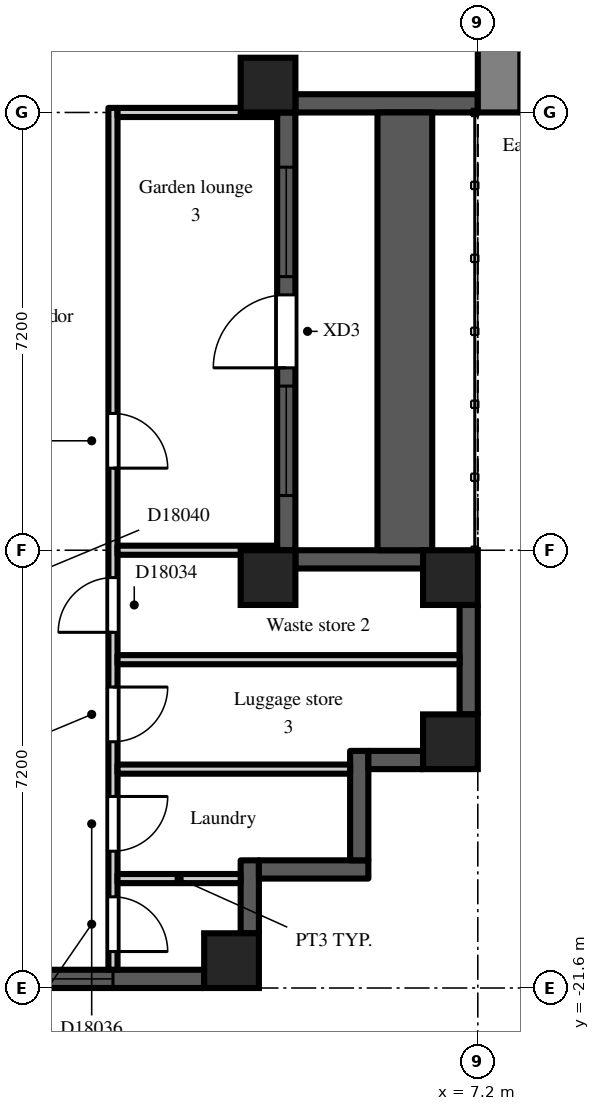
"""IFC4 building model, lengths in metres.
Left out: names, types, materials, properties, quantities, classifications, styles, units other than length and angle.
Written with IfcOpenShell. Run it as: python <this file> out.ifc"""

import sys

from ifc_helpers import new_model, si_unit, direction, frame, frame_2d, origin, origin_2d, place, context, subcontext, project, spatial, rectangle, extrude, element, fill, save


model = new_model("IFC4")
c1 = context("Model", 3, precision=1e-05, world=origin(), true_north=direction((0.0, 1.0)))
c2 = subcontext(c1, "Body", "Model", "MODEL_VIEW")
j1 = project(units=[si_unit("LENGTHUNIT", "METRE"), si_unit("PLANEANGLEUNIT", "RADIAN")], contexts=[c1])
p1 = place(None, origin())
s1 = spatial("IfcSite", under=j1, at=p1, CompositionType="ELEMENT")
p2 = place(p1, origin())
s2 = spatial("IfcBuilding", under=s1, at=p2, CompositionType="ELEMENT")
p3 = place(p2, frame((0.0, 0.0, 120.3)))
s3 = spatial("IfcBuildingStorey", under=s2, at=p3, CompositionType="ELEMENT", Elevation=120.3)
for number, where, z_axis, x_axis in (
    (1, (3.15, -21.15, 0.0), (0.0, 0.0, 1.0), (1.0, 0.0, 0.0)),
    (2, (3.75, -14.85, 0.0), (0.0, 0.0, 1.0), (1.0, 0.0, 0.0)),
    (3, (3.75, -6.75, 0.0), (0.0, 0.0, 1.0), (1.0, 0.0, 0.0)),
    (4, (6.75, -17.55, 0.0), (0.0, 0.0, 1.0), (1.0, 0.0, 0.0)),
    (5, (6.75, -14.85, 0.0), (0.0, 0.0, 1.0), (1.0, 0.0, 0.0)),
):
    element("IfcColumn", number, at=place(p3, frame(where, z_axis=z_axis, x_axis=x_axis)), inside=s3, PredefinedType="COLUMN", context=c2, shape_type="SweptSolid", body=[
        extrude(rectangle(XDim=0.9, YDim=0.9, at=origin_2d()), origin(), (0.0, 0.0, 1.0), 3.0),
    ])
p4 = place(p3, frame((-2.7, -21.45, 0.0), z_axis=(0.0, 0.0, 1.0), x_axis=(1.0, 0.0, 0.0)))
e6 = element("IfcWall", 6, at=p4, inside=s3, PredefinedType="SOLIDWALL", context=c2, shape_type="SweptSolid", body=[
    extrude(rectangle(XDim=5.4, YDim=0.3, at=frame_2d((2.7, 0.0))), origin(), (0.0, 0.0, 1.0), 2.2),
])
p5 = place(p4, frame((1.5, 0.0, 0.2)))
e7 = element("IfcOpeningElement", 7, at=p5, cuts=e6, PredefinedType="OPENING", context=c2, shape_type="SweptSolid", body=[
    extrude(rectangle(XDim=2.4, YDim=1.85, at=frame_2d((1.2, 0.925))), frame((0.0, 0.16, 0.0), z_axis=(0.0, -1.0, 0.0), x_axis=(1.0, 0.0, 0.0)), (0.0, 0.0, 1.0), 0.32),
])
p6 = place(p4, frame((0.15, 0.0, 0.2)))
e8 = element("IfcOpeningElement", 8, at=p6, cuts=e6, PredefinedType="OPENING", context=c2, shape_type="SweptSolid", body=[
    extrude(rectangle(XDim=1.2, YDim=1.85, at=frame_2d((0.6, 0.925))), frame((0.0, 0.16, 0.0), z_axis=(0.0, -1.0, 0.0), x_axis=(1.0, 0.0, 0.0)), (0.0, 0.0, 1.0), 0.32),
])
p7 = place(p3, frame((3.45, -20.7, 0.0), z_axis=(0.0, 0.0, 1.0), x_axis=(0.0, 1.0, 0.0)))
e9 = element("IfcWall", 9, at=p7, inside=s3, PredefinedType="SOLIDWALL", context=c2, shape_type="SweptSolid", body=[
    extrude(rectangle(XDim=1.2, YDim=0.3, at=frame_2d((0.6, 0.0))), origin(), (0.0, 0.0, 1.0), 2.6),
])
p8 = place(p3, frame((3.6, -19.65, 0.0), z_axis=(0.0, 0.0, 1.0), x_axis=(1.0, 0.0, 0.0)))
e10 = element("IfcWall", 10, at=p8, inside=s3, PredefinedType="SOLIDWALL", context=c2, shape_type="SweptSolid", body=[
    extrude(rectangle(XDim=1.8, YDim=0.3, at=frame_2d((0.9, 0.0))), origin(), (0.0, 0.0, 1.0), 2.6),
])
p9 = place(p3, frame((5.25, -19.5, 0.0), z_axis=(0.0, 0.0, 1.0), x_axis=(0.0, 1.0, 0.0)))
e11 = element("IfcWall", 11, at=p9, inside=s3, PredefinedType="SOLIDWALL", context=c2, shape_type="SweptSolid", body=[
    extrude(rectangle(XDim=1.8, YDim=0.3, at=frame_2d((0.9, 0.0))), origin(), (0.0, 0.0, 1.0), 2.6),
])
p10 = place(p3, frame((5.4, -17.85, 0.0), z_axis=(0.0, 0.0, 1.0), x_axis=(1.0, 0.0, 0.0)))
e12 = element("IfcWall", 12, at=p10, inside=s3, PredefinedType="SOLIDWALL", context=c2, shape_type="SweptSolid", body=[
    extrude(rectangle(XDim=0.9, YDim=0.3, at=frame_2d((0.45, 0.0))), origin(), (0.0, 0.0, 1.0), 2.6),
])
p11 = place(p3, frame((7.05, -17.1, 0.0), z_axis=(0.0, 0.0, 1.0), x_axis=(0.0, 1.0, 0.0)))
e13 = element("IfcWall", 13, at=p11, inside=s3, PredefinedType="SOLIDWALL", context=c2, shape_type="SweptSolid", body=[
    extrude(rectangle(XDim=1.8, YDim=0.3, at=frame_2d((0.9, 0.0))), origin(), (0.0, 0.0, 1.0), 2.2),
])
p12 = place(p3, frame((6.3, -14.55, 0.0), z_axis=(0.0, 0.0, 1.0), x_axis=(-1.0, 0.0, 0.0)))
e14 = element("IfcWall", 14, at=p12, inside=s3, PredefinedType="SOLIDWALL", context=c2, shape_type="SweptSolid", body=[
    extrude(rectangle(XDim=2.1, YDim=0.3, at=frame_2d((1.05, 0.0))), origin(), (0.0, 0.0, 1.0), 2.2),
])
p13 = place(p3, frame((4.05, -14.4, 0.0), z_axis=(0.0, 0.0, 1.0), x_axis=(0.0, 1.0, 0.0)))
e15 = element("IfcWall", 15, at=p13, inside=s3, PredefinedType="SOLIDWALL", context=c2, shape_type="SweptSolid", body=[
    extrude(rectangle(XDim=7.2, YDim=0.3, at=frame_2d((3.6, 0.0))), origin(), (0.0, 0.0, 1.0), 2.2),
])
p14 = place(p13, frame((3.0, 0.0, 0.0)))
e16 = element("IfcOpeningElement", 16, at=p14, cuts=e15, PredefinedType="OPENING", context=c2, shape_type="SweptSolid", body=[
    extrude(rectangle(XDim=1.2, YDim=2.05, at=frame_2d((0.6, 1.025))), frame((0.0, 0.16, 0.0), z_axis=(0.0, -1.0, 0.0), x_axis=(1.0, 0.0, 0.0)), (0.0, 0.0, 1.0), 0.32),
])
p15 = place(p13, frame((0.9, 0.0, 0.2)))
e17 = element("IfcOpeningElement", 17, at=p15, cuts=e15, PredefinedType="OPENING", context=c2, shape_type="SweptSolid", body=[
    extrude(rectangle(XDim=1.8, YDim=1.85, at=frame_2d((0.9, 0.925))), frame((0.0, 0.16, 0.0), z_axis=(0.0, -1.0, 0.0), x_axis=(1.0, 0.0, 0.0)), (0.0, 0.0, 1.0), 0.32),
])
p16 = place(p13, frame((4.5, 0.0, 0.2)))
e18 = element("IfcOpeningElement", 18, at=p16, cuts=e15, PredefinedType="OPENING", context=c2, shape_type="SweptSolid", body=[
    extrude(rectangle(XDim=1.8, YDim=1.85, at=frame_2d((0.9, 0.925))), frame((0.0, 0.16, 0.0), z_axis=(0.0, -1.0, 0.0), x_axis=(1.0, 0.0, 0.0)), (0.0, 0.0, 1.0), 0.32),
])
p17 = place(p3, frame((4.2, -7.05, 0.0), z_axis=(0.0, 0.0, 1.0), x_axis=(1.0, 0.0, 0.0)))
e19 = element("IfcWall", 19, at=p17, inside=s3, PredefinedType="SOLIDWALL", context=c2, shape_type="SweptSolid", body=[
    extrude(rectangle(XDim=3.0, YDim=0.3, at=frame_2d((1.5, 0.0))), origin(), (0.0, 0.0, 1.0), 2.2),
])
p18 = place(p3, frame((6.0, -14.4, 0.0), z_axis=(0.0, 0.0, 1.0), x_axis=(0.0, 1.0, 0.0)))
e20 = element("IfcWall", 20, at=p18, inside=s3, PredefinedType="PARAPET", context=c2, shape_type="SweptSolid", body=[
    extrude(rectangle(XDim=7.2, YDim=0.9, at=frame_2d((3.6, 0.0))), origin(), (0.0, 0.0, 1.0), 0.8),
])
p19 = place(p3, frame((7.55, -7.2, 0.0), z_axis=(0.0, 0.0, 1.0), x_axis=(0.0, 1.0, 0.0)))
e21 = element("IfcWall", 21, at=p19, inside=s3, PredefinedType="SHEAR", context=c2, shape_type="SweptSolid", body=[
    extrude(rectangle(XDim=14.4, YDim=0.7, at=frame_2d((7.2, 0.0))), origin(), (0.0, 0.0, 1.0), 2.6),
])
p20 = place(p19, frame((6.0, 0.0, 0.0)))
e22 = element("IfcOpeningElement", 22, at=p20, cuts=e21, PredefinedType="OPENING", context=c2, shape_type="SweptSolid", body=[
    extrude(rectangle(XDim=2.4, YDim=2.2, at=frame_2d((1.2, 1.1))), frame((0.0, 0.36, 0.0), z_axis=(0.0, -1.0, 0.0), x_axis=(1.0, 0.0, 0.0)), (0.0, 0.0, 1.0), 0.72),
])
p21 = place(p3, frame((1.2, -21.3, 0.0), z_axis=(0.0, 0.0, 1.0), x_axis=(0.0, 1.0, 0.0)))
e23 = element("IfcWall", 23, at=p21, inside=s3, PredefinedType="PARTITIONING", context=c2, shape_type="SweptSolid", body=[
    extrude(rectangle(XDim=14.175, YDim=0.15, at=frame_2d((7.087, 0.0))), origin(), (0.0, 0.0, 1.0), 2.6),
])
p22 = place(p21, frame((8.25, 0.0, 0.0)))
e24 = element("IfcOpeningElement", 24, at=p22, cuts=e23, PredefinedType="OPENING", context=c2, shape_type="SweptSolid", body=[
    extrude(rectangle(XDim=0.9, YDim=2.1, at=frame_2d((0.45, 1.05))), frame((0.0, 0.085, 0.0), z_axis=(0.0, -1.0, 0.0), x_axis=(1.0, 0.0, 0.0)), (0.0, 0.0, 1.0), 0.17),
])
p23 = place(p21, frame((5.55, 0.0, 0.0)))
e25 = element("IfcOpeningElement", 25, at=p23, cuts=e23, PredefinedType="OPENING", context=c2, shape_type="SweptSolid", body=[
    extrude(rectangle(XDim=0.9, YDim=2.1, at=frame_2d((0.45, 1.05))), frame((0.0, 0.085, 0.0), z_axis=(0.0, -1.0, 0.0), x_axis=(1.0, 0.0, 0.0)), (0.0, 0.0, 1.0), 0.17),
])
p24 = place(p21, frame((3.75, 0.0, 0.0)))
e26 = element("IfcOpeningElement", 26, at=p24, cuts=e23, PredefinedType="OPENING", context=c2, shape_type="SweptSolid", body=[
    extrude(rectangle(XDim=0.9, YDim=2.1, at=frame_2d((0.45, 1.05))), frame((0.0, 0.085, 0.0), z_axis=(0.0, -1.0, 0.0), x_axis=(1.0, 0.0, 0.0)), (0.0, 0.0, 1.0), 0.17),
])
p25 = place(p21, frame((1.95, 0.0, 0.0)))
e27 = element("IfcOpeningElement", 27, at=p25, cuts=e23, PredefinedType="OPENING", context=c2, shape_type="SweptSolid", body=[
    extrude(rectangle(XDim=0.9, YDim=2.1, at=frame_2d((0.45, 1.05))), frame((0.0, 0.085, 0.0), z_axis=(0.0, -1.0, 0.0), x_axis=(1.0, 0.0, 0.0)), (0.0, 0.0, 1.0), 0.17),
])
p26 = place(p21, frame((0.3, 0.0, 0.0)))
e28 = element("IfcOpeningElement", 28, at=p26, cuts=e23, PredefinedType="OPENING", context=c2, shape_type="SweptSolid", body=[
    extrude(rectangle(XDim=0.9, YDim=2.1, at=frame_2d((0.45, 1.05))), frame((0.0, 0.085, 0.0), z_axis=(0.0, -1.0, 0.0), x_axis=(1.0, 0.0, 0.0)), (0.0, 0.0, 1.0), 0.17),
])
p27 = place(p3, frame((1.275, -19.8, 0.0), z_axis=(0.0, 0.0, 1.0), x_axis=(1.0, 0.0, 0.0)))
e29 = element("IfcWall", 29, at=p27, inside=s3, PredefinedType="PARTITIONING", context=c2, shape_type="SweptSolid", body=[
    extrude(rectangle(XDim=2.025, YDim=0.15, at=frame_2d((1.013, 0.0))), origin(), (0.0, 0.0, 1.0), 2.6),
])
p28 = place(p3, frame((1.275, -18.0, 0.0), z_axis=(0.0, 0.0, 1.0), x_axis=(1.0, 0.0, 0.0)))
e30 = element("IfcWall", 30, at=p28, inside=s3, PredefinedType="PARTITIONING", context=c2, shape_type="SweptSolid", body=[
    extrude(rectangle(XDim=3.825, YDim=0.15, at=frame_2d((1.913, 0.0))), origin(), (0.0, 0.0, 1.0), 2.6),
])
p29 = place(p3, frame((1.275, -16.2, 0.0), z_axis=(0.0, 0.0, 1.0), x_axis=(1.0, 0.0, 0.0)))
e31 = element("IfcWall", 31, at=p29, inside=s3, PredefinedType="PARTITIONING", context=c2, shape_type="SweptSolid", body=[
    extrude(rectangle(XDim=5.625, YDim=0.15, at=frame_2d((2.812, 0.0))), origin(), (0.0, 0.0, 1.0), 2.6),
])
for number, where, z_axis, x_axis in (
    (32, (1.275, -14.4, 0.0), (0.0, 0.0, 1.0), (1.0, 0.0, 0.0)),
    (33, (1.275, -7.2, 0.0), (0.0, 0.0, 1.0), (1.0, 0.0, 0.0)),
):
    element("IfcWall", number, at=place(p3, frame(where, z_axis=z_axis, x_axis=x_axis)), inside=s3, PredefinedType="PARTITIONING", context=c2, shape_type="SweptSolid", body=[
        extrude(rectangle(XDim=2.625, YDim=0.15, at=frame_2d((1.312, 0.0))), origin(), (0.0, 0.0, 1.0), 2.6),
    ])
p30 = place(p5, origin())
e34 = element("IfcWindow", 34, at=p30, inside=s3, PartitioningType="SINGLE_PANEL", PredefinedType="WINDOW", context=c2, shape_type="SweptSolid", body=[
    extrude(rectangle(XDim=2.4, YDim=1.85, at=frame_2d((1.2, 0.925))), frame((0.0, 0.03, 0.0), z_axis=(0.0, -1.0, 0.0), x_axis=(1.0, 0.0, 0.0)), (0.0, 0.0, 1.0), 0.06),
])
fill(e7, e34)
p31 = place(p14, origin())
e35 = element("IfcDoor", 35, at=p31, inside=s3, OperationType="SINGLE_SWING_LEFT", PredefinedType="DOOR", context=c2, shape_type="SweptSolid", body=[
    extrude(rectangle(XDim=1.2, YDim=2.05, at=frame_2d((0.6, 1.025))), frame((0.0, 0.025, 0.0), z_axis=(0.0, -1.0, 0.0), x_axis=(1.0, 0.0, 0.0)), (0.0, 0.0, 1.0), 0.05),
])
fill(e16, e35)
p32 = place(p15, origin())
e36 = element("IfcWindow", 36, at=p32, inside=s3, PartitioningType="SINGLE_PANEL", PredefinedType="WINDOW", context=c2, shape_type="SweptSolid", body=[
    extrude(rectangle(XDim=1.8, YDim=1.85, at=frame_2d((0.9, 0.925))), frame((0.0, 0.03, 0.0), z_axis=(0.0, -1.0, 0.0), x_axis=(1.0, 0.0, 0.0)), (0.0, 0.0, 1.0), 0.06),
])
fill(e17, e36)
p33 = place(p16, origin())
e37 = element("IfcWindow", 37, at=p33, inside=s3, PartitioningType="SINGLE_PANEL", PredefinedType="WINDOW", context=c2, shape_type="SweptSolid", body=[
    extrude(rectangle(XDim=1.8, YDim=1.85, at=frame_2d((0.9, 0.925))), frame((0.0, 0.03, 0.0), z_axis=(0.0, -1.0, 0.0), x_axis=(1.0, 0.0, 0.0)), (0.0, 0.0, 1.0), 0.06),
])
fill(e18, e37)
p34 = place(p22, frame((0.9, 0.0, 0.0), z_axis=(0.0, 0.0, 1.0), x_axis=(-1.0, 0.0, 0.0)))
e38 = element("IfcDoor", 38, at=p34, inside=s3, OperationType="SINGLE_SWING_RIGHT", PredefinedType="DOOR", context=c2, shape_type="SweptSolid", body=[
    extrude(rectangle(XDim=0.9, YDim=2.1, at=frame_2d((0.45, 1.05))), frame((0.0, 0.025, 0.0), z_axis=(0.0, -1.0, 0.0), x_axis=(1.0, 0.0, 0.0)), (0.0, 0.0, 1.0), 0.05),
])
fill(e24, e38)
p35 = place(p23, origin())
e39 = element("IfcDoor", 39, at=p35, inside=s3, OperationType="SINGLE_SWING_LEFT", PredefinedType="DOOR", context=c2, shape_type="SweptSolid", body=[
    extrude(rectangle(XDim=0.9, YDim=2.1, at=frame_2d((0.45, 1.05))), frame((0.0, 0.025, 0.0), z_axis=(0.0, -1.0, 0.0), x_axis=(1.0, 0.0, 0.0)), (0.0, 0.0, 1.0), 0.05),
])
fill(e25, e39)
p36 = place(p24, frame((0.9, 0.0, 0.0), z_axis=(0.0, 0.0, 1.0), x_axis=(-1.0, 0.0, 0.0)))
e40 = element("IfcDoor", 40, at=p36, inside=s3, OperationType="SINGLE_SWING_LEFT", PredefinedType="DOOR", context=c2, shape_type="SweptSolid", body=[
    extrude(rectangle(XDim=0.9, YDim=2.1, at=frame_2d((0.45, 1.05))), frame((0.0, 0.025, 0.0), z_axis=(0.0, -1.0, 0.0), x_axis=(1.0, 0.0, 0.0)), (0.0, 0.0, 1.0), 0.05),
])
fill(e26, e40)
p37 = place(p25, frame((0.9, 0.0, 0.0), z_axis=(0.0, 0.0, 1.0), x_axis=(-1.0, 0.0, 0.0)))
e41 = element("IfcDoor", 41, at=p37, inside=s3, OperationType="SINGLE_SWING_LEFT", PredefinedType="DOOR", context=c2, shape_type="SweptSolid", body=[
    extrude(rectangle(XDim=0.9, YDim=2.1, at=frame_2d((0.45, 1.05))), frame((0.0, 0.025, 0.0), z_axis=(0.0, -1.0, 0.0), x_axis=(1.0, 0.0, 0.0)), (0.0, 0.0, 1.0), 0.05),
])
fill(e27, e41)
p38 = place(p26, frame((0.9, 0.0, 0.0), z_axis=(0.0, 0.0, 1.0), x_axis=(-1.0, 0.0, 0.0)))
e42 = element("IfcDoor", 42, at=p38, inside=s3, OperationType="SINGLE_SWING_RIGHT", PredefinedType="DOOR", context=c2, shape_type="SweptSolid", body=[
    extrude(rectangle(XDim=0.9, YDim=2.1, at=frame_2d((0.45, 1.05))), frame((0.0, 0.025, 0.0), z_axis=(0.0, -1.0, 0.0), x_axis=(1.0, 0.0, 0.0)), (0.0, 0.0, 1.0), 0.05),
])
fill(e28, e42)
save(model, sys.argv[1])
